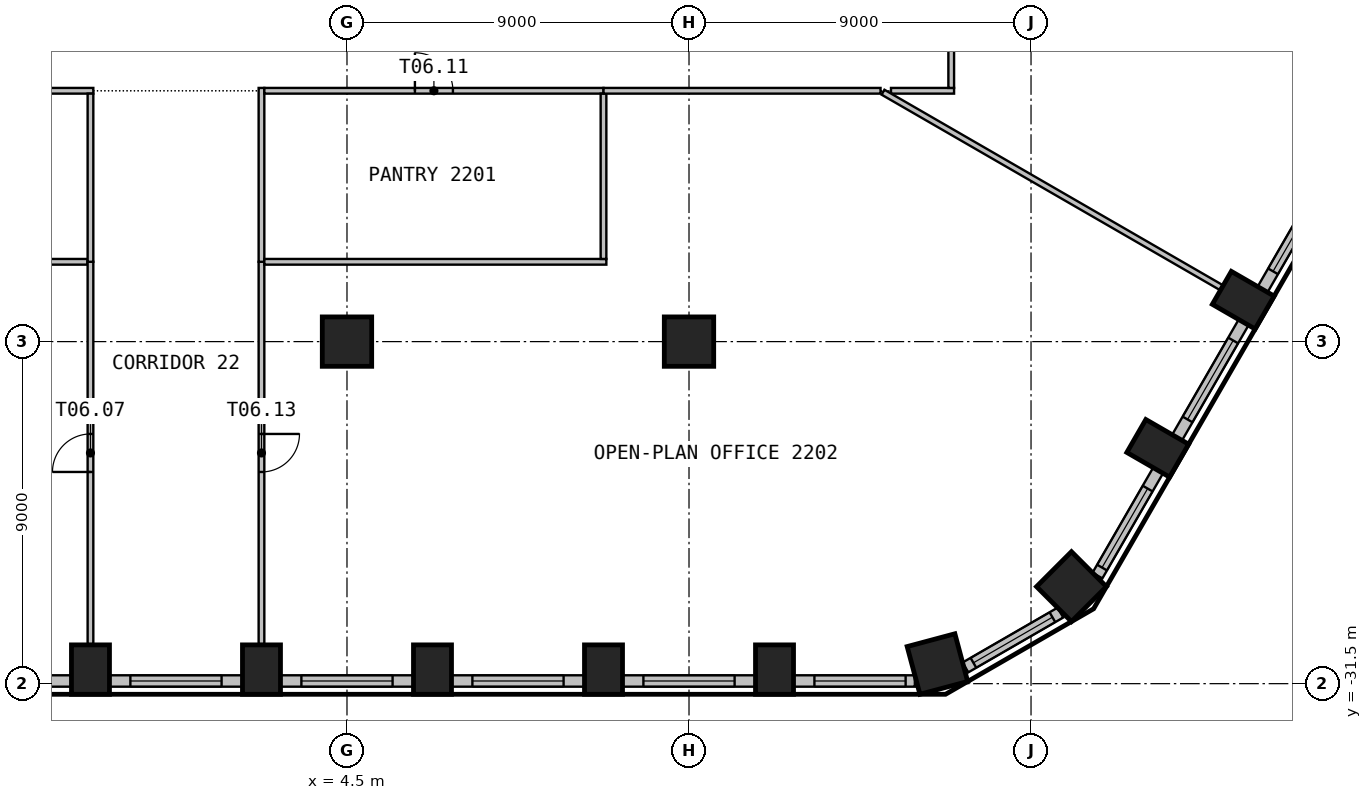
"""IFC4 building model, lengths in metres.
Left out: names, types, materials, properties, quantities, classifications, styles, units other than length and angle.
Written with IfcOpenShell. Run it as: python <this file> out.ifc"""

import sys

from ifc_helpers import new_model, si_unit, direction, frame, frame_2d, origin, origin_2d, place, context, subcontext, project, spatial, rectangle, circle, extrude, element, fill, save


model = new_model("IFC4")
c1 = context("Model", 3, precision=1e-05, world=origin(), true_north=direction((0.0, 1.0)))
c2 = subcontext(c1, "Body", "Model", "MODEL_VIEW")
j1 = project(units=[si_unit("LENGTHUNIT", "METRE"), si_unit("PLANEANGLEUNIT", "RADIAN")], contexts=[c1])
p1 = place(None, origin())
s1 = spatial("IfcSite", under=j1, at=p1, CompositionType="ELEMENT")
p2 = place(p1, origin())
s2 = spatial("IfcBuilding", under=s1, at=p2, CompositionType="ELEMENT")
p3 = place(p2, frame((0.0, 0.0, 93.0)))
s3 = spatial("IfcBuildingStorey", under=s2, at=p3, CompositionType="ELEMENT", Elevation=93.0)
for number, where, z_axis, x_axis in (
    (1, (-2.25, -31.13, 0.0), (0.0, 0.0, 1.0), (1.0, 0.0, 0.0)),
    (2, (2.25, -31.13, 0.0), (0.0, 0.0, 1.0), (1.0, 0.0, 0.0)),
    (3, (6.75, -31.13, 0.0), (0.0, 0.0, 1.0), (1.0, 0.0, 0.0)),
    (4, (11.25, -31.13, 0.0), (0.0, 0.0, 1.0), (1.0, 0.0, 0.0)),
    (5, (15.75, -31.13, 0.0), (0.0, 0.0, 1.0), (1.0, 0.0, 0.0)),
):
    element("IfcColumn", number, at=place(p3, frame(where, z_axis=z_axis, x_axis=x_axis)), inside=s3, PredefinedType="COLUMN", context=c2, shape_type="SweptSolid", body=[
        extrude(rectangle(XDim=1.0, YDim=1.3, at=origin_2d()), origin(), (0.0, 0.0, 1.0), 3.525),
    ])
for number, where, z_axis, x_axis in (
    (6, (20.037, -30.984, 0.0), (0.0, 0.0, 1.0), (0.966, 0.259, 0.0)),
    (7, (23.564, -28.947, 0.0), (0.0, 0.0, 1.0), (0.707, 0.707, 0.0)),
):
    element("IfcColumn", number, at=place(p3, frame(where, z_axis=z_axis, x_axis=x_axis)), inside=s3, PredefinedType="COLUMN", context=c2, shape_type="SweptSolid", body=[
        extrude(rectangle(XDim=1.3, YDim=1.3, at=origin_2d()), origin(), (0.0, 0.0, 1.0), 3.525),
    ])
for number, where, z_axis, x_axis in (
    (8, (25.834, -25.308, 0.0), (0.0, 0.0, 1.0), (0.5, 0.866, 0.0)),
    (9, (28.084, -21.411, 0.0), (0.0, 0.0, 1.0), (0.5, 0.866, 0.0)),
):
    element("IfcColumn", number, at=place(p3, frame(where, z_axis=z_axis, x_axis=x_axis)), inside=s3, PredefinedType="COLUMN", context=c2, shape_type="SweptSolid", body=[
        extrude(rectangle(XDim=1.0, YDim=1.3, at=origin_2d()), origin(), (0.0, 0.0, 1.0), 3.525),
    ])
for number, where, z_axis, x_axis in (
    (10, (4.5, -22.5, 0.0), (0.0, 0.0, 1.0), (1.0, 0.0, 0.0)),
    (11, (13.5, -22.5, 0.0), (0.0, 0.0, 1.0), (1.0, 0.0, 0.0)),
):
    element("IfcColumn", number, at=place(p3, frame(where, z_axis=z_axis, x_axis=x_axis)), inside=s3, PredefinedType="COLUMN", context=c2, shape_type="SweptSolid", body=[
        extrude(circle(Radius=0.65, at=origin_2d()), origin(), (0.0, 0.0, 1.0), 3.525),
    ])
p4 = place(p3, frame((-6.25, -31.43, 0.0), z_axis=(0.0, 0.0, 1.0), x_axis=(1.0, 0.0, 0.0)))
e12 = element("IfcWall", 12, at=p4, inside=s3, PredefinedType="SOLIDWALL", context=c2, shape_type="SweptSolid", body=[
    extrude(rectangle(XDim=3.499, YDim=0.3, at=frame_2d((1.75, 0.0))), origin(), (0.0, 0.0, 1.0), 3.525),
])
p5 = place(p4, frame((0.55, 0.0, 0.9)))
e13 = element("IfcOpeningElement", 13, at=p5, cuts=e12, PredefinedType="OPENING", context=c2, shape_type="SweptSolid", body=[
    extrude(rectangle(XDim=2.4, YDim=2.1, at=frame_2d((1.2, 1.05))), frame((0.0, 0.16, 0.0), z_axis=(0.0, -1.0, 0.0), x_axis=(1.0, 0.0, 0.0)), (0.0, 0.0, 1.0), 0.32),
])
p6 = place(p3, frame((-1.75, -31.43, 0.0), z_axis=(0.0, 0.0, 1.0), x_axis=(1.0, 0.0, 0.0)))
e14 = element("IfcWall", 14, at=p6, inside=s3, PredefinedType="SOLIDWALL", context=c2, shape_type="SweptSolid", body=[
    extrude(rectangle(XDim=3.499, YDim=0.3, at=frame_2d((1.75, 0.0))), origin(), (0.0, 0.0, 1.0), 3.525),
])
p7 = place(p6, frame((0.55, 0.0, 0.9)))
e15 = element("IfcOpeningElement", 15, at=p7, cuts=e14, PredefinedType="OPENING", context=c2, shape_type="SweptSolid", body=[
    extrude(rectangle(XDim=2.4, YDim=2.1, at=frame_2d((1.2, 1.05))), frame((0.0, 0.16, 0.0), z_axis=(0.0, -1.0, 0.0), x_axis=(1.0, 0.0, 0.0)), (0.0, 0.0, 1.0), 0.32),
])
p8 = place(p3, frame((2.75, -31.43, 0.0), z_axis=(0.0, 0.0, 1.0), x_axis=(1.0, 0.0, 0.0)))
e16 = element("IfcWall", 16, at=p8, inside=s3, PredefinedType="SOLIDWALL", context=c2, shape_type="SweptSolid", body=[
    extrude(rectangle(XDim=3.499, YDim=0.3, at=frame_2d((1.75, 0.0))), origin(), (0.0, 0.0, 1.0), 3.525),
])
p9 = place(p8, frame((0.55, 0.0, 0.9)))
e17 = element("IfcOpeningElement", 17, at=p9, cuts=e16, PredefinedType="OPENING", context=c2, shape_type="SweptSolid", body=[
    extrude(rectangle(XDim=2.4, YDim=2.1, at=frame_2d((1.2, 1.05))), frame((0.0, 0.16, 0.0), z_axis=(0.0, -1.0, 0.0), x_axis=(1.0, 0.0, 0.0)), (0.0, 0.0, 1.0), 0.32),
])
p10 = place(p3, frame((7.25, -31.43, 0.0), z_axis=(0.0, 0.0, 1.0), x_axis=(1.0, 0.0, 0.0)))
e18 = element("IfcWall", 18, at=p10, inside=s3, PredefinedType="SOLIDWALL", context=c2, shape_type="SweptSolid", body=[
    extrude(rectangle(XDim=3.499, YDim=0.3, at=frame_2d((1.75, 0.0))), origin(), (0.0, 0.0, 1.0), 3.525),
])
p11 = place(p10, frame((0.55, 0.0, 0.9)))
e19 = element("IfcOpeningElement", 19, at=p11, cuts=e18, PredefinedType="OPENING", context=c2, shape_type="SweptSolid", body=[
    extrude(rectangle(XDim=2.4, YDim=2.1, at=frame_2d((1.2, 1.05))), frame((0.0, 0.16, 0.0), z_axis=(0.0, -1.0, 0.0), x_axis=(1.0, 0.0, 0.0)), (0.0, 0.0, 1.0), 0.32),
])
p12 = place(p3, frame((11.75, -31.43, 0.0), z_axis=(0.0, 0.0, 1.0), x_axis=(1.0, 0.0, 0.0)))
e20 = element("IfcWall", 20, at=p12, inside=s3, PredefinedType="SOLIDWALL", context=c2, shape_type="SweptSolid", body=[
    extrude(rectangle(XDim=3.499, YDim=0.3, at=frame_2d((1.75, 0.0))), origin(), (0.0, 0.0, 1.0), 3.525),
])
p13 = place(p12, frame((0.55, 0.0, 0.9)))
e21 = element("IfcOpeningElement", 21, at=p13, cuts=e20, PredefinedType="OPENING", context=c2, shape_type="SweptSolid", body=[
    extrude(rectangle(XDim=2.4, YDim=2.1, at=frame_2d((1.2, 1.05))), frame((0.0, 0.16, 0.0), z_axis=(0.0, -1.0, 0.0), x_axis=(1.0, 0.0, 0.0)), (0.0, 0.0, 1.0), 0.32),
])
p14 = place(p3, frame((16.25, -31.43, 0.0), z_axis=(0.0, 0.0, 1.0), x_axis=(1.0, 0.0, 0.0)))
e22 = element("IfcWall", 22, at=p14, inside=s3, PredefinedType="SOLIDWALL", context=c2, shape_type="SweptSolid", body=[
    extrude(rectangle(XDim=3.192, YDim=0.3, at=frame_2d((1.596, 0.0))), origin(), (0.0, 0.0, 1.0), 3.525),
])
p15 = place(p14, frame((0.55, 0.0, 0.9)))
e23 = element("IfcOpeningElement", 23, at=p15, cuts=e22, PredefinedType="OPENING", context=c2, shape_type="SweptSolid", body=[
    extrude(rectangle(XDim=2.4, YDim=2.1, at=frame_2d((1.2, 1.05))), frame((0.0, 0.16, 0.0), z_axis=(0.0, -1.0, 0.0), x_axis=(1.0, 0.0, 0.0)), (0.0, 0.0, 1.0), 0.32),
])
p16 = place(p3, frame((20.774, -31.073, 0.0), z_axis=(0.0, 0.0, 1.0), x_axis=(0.866053149362, 0.49995194017, 0.0)))
e24 = element("IfcWall", 24, at=p16, inside=s3, PredefinedType="SOLIDWALL", context=c2, shape_type="SweptSolid", body=[
    extrude(rectangle(XDim=2.885, YDim=0.3, at=frame_2d((1.443, 0.0))), origin(), (0.0, 0.0, 1.0), 3.525),
])
p17 = place(p16, frame((0.243, 0.0, 0.9)))
e25 = element("IfcOpeningElement", 25, at=p17, cuts=e24, PredefinedType="OPENING", context=c2, shape_type="SweptSolid", body=[
    extrude(rectangle(XDim=2.4, YDim=2.1, at=frame_2d((1.2, 1.05))), frame((0.0, 0.16, 0.0), z_axis=(0.0, -1.0, 0.0), x_axis=(1.0, 0.0, 0.0)), (0.0, 0.0, 1.0), 0.32),
])
p18 = place(p3, frame((24.248, -28.656, 0.0), z_axis=(0.0, 0.0, 1.0), x_axis=(0.500004907028, 0.866022570692, 0.0)))
e26 = element("IfcWall", 26, at=p18, inside=s3, PredefinedType="SOLIDWALL", context=c2, shape_type="SweptSolid", body=[
    extrude(rectangle(XDim=3.192, YDim=0.3, at=frame_2d((1.596, 0.0))), origin(), (0.0, 0.0, 1.0), 3.525),
])
p19 = place(p18, frame((0.243, 0.0, 0.9)))
e27 = element("IfcOpeningElement", 27, at=p19, cuts=e26, PredefinedType="OPENING", context=c2, shape_type="SweptSolid", body=[
    extrude(rectangle(XDim=2.4, YDim=2.1, at=frame_2d((1.2, 1.05))), frame((0.0, 0.16, 0.0), z_axis=(0.0, -1.0, 0.0), x_axis=(1.0, 0.0, 0.0)), (0.0, 0.0, 1.0), 0.32),
])
p20 = place(p3, frame((26.344, -25.024, 0.0), z_axis=(0.0, 0.0, 1.0), x_axis=(0.499996256241, 0.866027565234, 0.0)))
e28 = element("IfcWall", 28, at=p20, inside=s3, PredefinedType="SOLIDWALL", context=c2, shape_type="SweptSolid", body=[
    extrude(rectangle(XDim=3.499, YDim=0.3, at=frame_2d((1.75, 0.0))), origin(), (0.0, 0.0, 1.0), 3.525),
])
p21 = place(p20, frame((0.55, 0.0, 0.9)))
e29 = element("IfcOpeningElement", 29, at=p21, cuts=e28, PredefinedType="OPENING", context=c2, shape_type="SweptSolid", body=[
    extrude(rectangle(XDim=2.4, YDim=2.1, at=frame_2d((1.2, 1.05))), frame((0.0, 0.16, 0.0), z_axis=(0.0, -1.0, 0.0), x_axis=(1.0, 0.0, 0.0)), (0.0, 0.0, 1.0), 0.32),
])
p22 = place(p3, frame((28.594, -21.127, 0.0), z_axis=(0.0, 0.0, 1.0), x_axis=(0.499996256241, 0.866027565234, 0.0)))
e30 = element("IfcWall", 30, at=p22, inside=s3, PredefinedType="SOLIDWALL", context=c2, shape_type="SweptSolid", body=[
    extrude(rectangle(XDim=3.499, YDim=0.3, at=frame_2d((1.75, 0.0))), origin(), (0.0, 0.0, 1.0), 3.525),
])
p23 = place(p22, frame((0.55, 0.0, 0.9)))
e31 = element("IfcOpeningElement", 31, at=p23, cuts=e30, PredefinedType="OPENING", context=c2, shape_type="SweptSolid", body=[
    extrude(rectangle(XDim=2.4, YDim=2.1, at=frame_2d((1.2, 1.05))), frame((0.0, 0.16, 0.0), z_axis=(0.0, -1.0, 0.0), x_axis=(1.0, 0.0, 0.0)), (0.0, 0.0, 1.0), 0.32),
])
p24 = place(p3, frame((-11.175, -20.4, 0.0), z_axis=(0.0, 0.0, 1.0), x_axis=(1.0, 0.0, 0.0)))
e32 = element("IfcWall", 32, at=p24, inside=s3, PredefinedType="PARTITIONING", context=c2, shape_type="SweptSolid", body=[
    extrude(rectangle(XDim=8.85, YDim=0.15, at=frame_2d((4.425, 0.0))), origin(), (0.0, 0.0, 1.0), 3.525),
])
p25 = place(p3, frame((-11.25, -15.9, 0.0), z_axis=(0.0, 0.0, 1.0), x_axis=(1.0, 0.0, 0.0)))
e33 = element("IfcWall", 33, at=p25, inside=s3, PredefinedType="PARTITIONING", context=c2, shape_type="SweptSolid", body=[
    extrude(rectangle(XDim=9.075, YDim=0.15, at=frame_2d((4.538, 0.0))), origin(), (0.0, 0.0, 1.0), 3.525),
])
p26 = place(p25, frame((4.038, 0.0, 0.0)))
e34 = element("IfcOpeningElement", 34, at=p26, cuts=e33, PredefinedType="OPENING", context=c2, shape_type="SweptSolid", body=[
    extrude(rectangle(XDim=1.0, YDim=2.1, at=frame_2d((0.5, 1.05))), frame((0.0, 0.085, 0.0), z_axis=(0.0, -1.0, 0.0), x_axis=(1.0, 0.0, 0.0)), (0.0, 0.0, 1.0), 0.17),
])
p27 = place(p3, frame((-2.25, -30.46, 0.0), z_axis=(0.0, 0.0, 1.0), x_axis=(0.0, 1.0, 0.0)))
e35 = element("IfcWall", 35, at=p27, inside=s3, PredefinedType="PARTITIONING", context=c2, shape_type="SweptSolid", body=[
    extrude(rectangle(XDim=10.06, YDim=0.15, at=frame_2d((5.03, 0.0))), origin(), (0.0, 0.0, 1.0), 3.525),
])
p28 = place(p27, frame((4.53, 0.0, 0.0)))
e36 = element("IfcOpeningElement", 36, at=p28, cuts=e35, PredefinedType="OPENING", context=c2, shape_type="SweptSolid", body=[
    extrude(rectangle(XDim=1.0, YDim=2.1, at=frame_2d((0.5, 1.05))), frame((0.0, 0.085, 0.0), z_axis=(0.0, -1.0, 0.0), x_axis=(1.0, 0.0, 0.0)), (0.0, 0.0, 1.0), 0.17),
])
p29 = place(p3, frame((-2.25, -20.4, 0.0), z_axis=(0.0, 0.0, 1.0), x_axis=(0.0, 1.0, 0.0)))
e37 = element("IfcWall", 37, at=p29, inside=s3, PredefinedType="PARTITIONING", context=c2, shape_type="SweptSolid", body=[
    extrude(rectangle(XDim=4.425, YDim=0.15, at=frame_2d((2.212, 0.0))), origin(), (0.0, 0.0, 1.0), 3.525),
])
p30 = place(p3, frame((2.25, -20.4, 0.0), z_axis=(0.0, 0.0, 1.0), x_axis=(0.0, -1.0, 0.0)))
e38 = element("IfcWall", 38, at=p30, inside=s3, PredefinedType="PARTITIONING", context=c2, shape_type="SweptSolid", body=[
    extrude(rectangle(XDim=10.06, YDim=0.15, at=frame_2d((5.03, 0.0))), origin(), (0.0, 0.0, 1.0), 3.525),
])
p31 = place(p30, frame((4.53, 0.0, 0.0)))
e39 = element("IfcOpeningElement", 39, at=p31, cuts=e38, PredefinedType="OPENING", context=c2, shape_type="SweptSolid", body=[
    extrude(rectangle(XDim=1.0, YDim=2.1, at=frame_2d((0.5, 1.05))), frame((0.0, 0.085, 0.0), z_axis=(0.0, -1.0, 0.0), x_axis=(1.0, 0.0, 0.0)), (0.0, 0.0, 1.0), 0.17),
])
p32 = place(p3, frame((2.25, -15.825, 0.0), z_axis=(0.0, 0.0, 1.0), x_axis=(0.0, -1.0, 0.0)))
e40 = element("IfcWall", 40, at=p32, inside=s3, PredefinedType="PARTITIONING", context=c2, shape_type="SweptSolid", body=[
    extrude(rectangle(XDim=4.575, YDim=0.15, at=frame_2d((2.288, 0.0))), origin(), (0.0, 0.0, 1.0), 3.525),
])
p33 = place(p3, frame((11.325, -20.4, 0.0), z_axis=(0.0, 0.0, 1.0), x_axis=(-1.0, 0.0, 0.0)))
e41 = element("IfcWall", 41, at=p33, inside=s3, PredefinedType="PARTITIONING", context=c2, shape_type="SweptSolid", body=[
    extrude(rectangle(XDim=9.0, YDim=0.15, at=frame_2d((4.5, 0.0))), origin(), (0.0, 0.0, 1.0), 3.525),
])
p34 = place(p3, frame((2.325, -15.9, 0.0), z_axis=(0.0, 0.0, 1.0), x_axis=(1.0, 0.0, 0.0)))
e42 = element("IfcWall", 42, at=p34, inside=s3, PredefinedType="PARTITIONING", context=c2, shape_type="SweptSolid", body=[
    extrude(rectangle(XDim=8.925, YDim=0.15, at=frame_2d((4.462, 0.0))), origin(), (0.0, 0.0, 1.0), 3.525),
])
p35 = place(p34, frame((3.962, 0.0, 0.0)))
e43 = element("IfcOpeningElement", 43, at=p35, cuts=e42, PredefinedType="OPENING", context=c2, shape_type="SweptSolid", body=[
    extrude(rectangle(XDim=1.0, YDim=2.1, at=frame_2d((0.5, 1.05))), frame((0.0, 0.085, 0.0), z_axis=(0.0, -1.0, 0.0), x_axis=(1.0, 0.0, 0.0)), (0.0, 0.0, 1.0), 0.17),
])
p36 = place(p3, frame((11.25, -15.975, 0.0), z_axis=(0.0, 0.0, 1.0), x_axis=(0.0, -1.0, 0.0)))
e44 = element("IfcWall", 44, at=p36, inside=s3, PredefinedType="PARTITIONING", context=c2, shape_type="SweptSolid", body=[
    extrude(rectangle(XDim=4.35, YDim=0.15, at=frame_2d((2.175, 0.0))), origin(), (0.0, 0.0, 1.0), 3.525),
])
p37 = place(p3, frame((11.25, -15.9, 0.0), z_axis=(0.0, 0.0, 1.0), x_axis=(1.0, 0.0, 0.0)))
e45 = element("IfcWall", 45, at=p37, inside=s3, PredefinedType="PARTITIONING", context=c2, shape_type="SweptSolid", body=[
    extrude(rectangle(XDim=7.29, YDim=0.15, at=frame_2d((3.645, 0.0))), origin(), (0.0, 0.0, 1.0), 3.525),
])
p38 = place(p3, frame((18.815, -15.9, 0.0), z_axis=(0.0, 0.0, 1.0), x_axis=(1.0, 0.0, 0.0)))
e46 = element("IfcWall", 46, at=p38, inside=s3, PredefinedType="PARTITIONING", context=c2, shape_type="SweptSolid", body=[
    extrude(rectangle(XDim=1.66, YDim=0.15, at=frame_2d((0.83, 0.0))), origin(), (0.0, 0.0, 1.0), 3.525),
])
p39 = place(p3, frame((18.605, -15.938, 0.0), z_axis=(0.0, 0.0, 1.0), x_axis=(0.8659928916, -0.500056308527, 0.0)))
e47 = element("IfcWall", 47, at=p39, inside=s3, PredefinedType="PARTITIONING", context=c2, shape_type="SweptSolid", body=[
    extrude(rectangle(XDim=10.276, YDim=0.15, at=frame_2d((5.138, 0.0))), origin(), (0.0, 0.0, 1.0), 3.525),
])
p40 = place(p3, frame((20.4, -15.825, 0.0), z_axis=(0.0, 0.0, 1.0), x_axis=(0.0, 1.0, 0.0)))
e48 = element("IfcWall", 48, at=p40, inside=s3, PredefinedType="PARTITIONING", context=c2, shape_type="SweptSolid", body=[
    extrude(rectangle(XDim=14.309, YDim=0.15, at=frame_2d((7.154, 0.0))), origin(), (0.0, 0.0, 1.0), 3.525),
])
p41 = place(p40, frame((6.655, 0.0, 0.0)))
e49 = element("IfcOpeningElement", 49, at=p41, cuts=e48, PredefinedType="OPENING", context=c2, shape_type="SweptSolid", body=[
    extrude(rectangle(XDim=1.0, YDim=2.1, at=frame_2d((0.5, 1.05))), frame((0.0, 0.085, 0.0), z_axis=(0.0, -1.0, 0.0), x_axis=(1.0, 0.0, 0.0)), (0.0, 0.0, 1.0), 0.17),
])
p42 = place(p7, origin())
e50 = element("IfcWindow", 50, at=p42, inside=s3, PartitioningType="SINGLE_PANEL", PredefinedType="WINDOW", context=c2, shape_type="SweptSolid", body=[
    extrude(rectangle(XDim=2.4, YDim=2.1, at=frame_2d((1.2, 1.05))), frame((0.0, 0.03, 0.0), z_axis=(0.0, -1.0, 0.0), x_axis=(1.0, 0.0, 0.0)), (0.0, 0.0, 1.0), 0.06),
])
fill(e15, e50)
p43 = place(p9, origin())
e51 = element("IfcWindow", 51, at=p43, inside=s3, PartitioningType="SINGLE_PANEL", PredefinedType="WINDOW", context=c2, shape_type="SweptSolid", body=[
    extrude(rectangle(XDim=2.4, YDim=2.1, at=frame_2d((1.2, 1.05))), frame((0.0, 0.03, 0.0), z_axis=(0.0, -1.0, 0.0), x_axis=(1.0, 0.0, 0.0)), (0.0, 0.0, 1.0), 0.06),
])
fill(e17, e51)
p44 = place(p11, origin())
e52 = element("IfcWindow", 52, at=p44, inside=s3, PartitioningType="SINGLE_PANEL", PredefinedType="WINDOW", context=c2, shape_type="SweptSolid", body=[
    extrude(rectangle(XDim=2.4, YDim=2.1, at=frame_2d((1.2, 1.05))), frame((0.0, 0.03, 0.0), z_axis=(0.0, -1.0, 0.0), x_axis=(1.0, 0.0, 0.0)), (0.0, 0.0, 1.0), 0.06),
])
fill(e19, e52)
p45 = place(p13, origin())
e53 = element("IfcWindow", 53, at=p45, inside=s3, PartitioningType="SINGLE_PANEL", PredefinedType="WINDOW", context=c2, shape_type="SweptSolid", body=[
    extrude(rectangle(XDim=2.4, YDim=2.1, at=frame_2d((1.2, 1.05))), frame((0.0, 0.03, 0.0), z_axis=(0.0, -1.0, 0.0), x_axis=(1.0, 0.0, 0.0)), (0.0, 0.0, 1.0), 0.06),
])
fill(e21, e53)
p46 = place(p15, origin())
e54 = element("IfcWindow", 54, at=p46, inside=s3, PartitioningType="SINGLE_PANEL", PredefinedType="WINDOW", context=c2, shape_type="SweptSolid", body=[
    extrude(rectangle(XDim=2.4, YDim=2.1, at=frame_2d((1.2, 1.05))), frame((0.0, 0.03, 0.0), z_axis=(0.0, -1.0, 0.0), x_axis=(1.0, 0.0, 0.0)), (0.0, 0.0, 1.0), 0.06),
])
fill(e23, e54)
p47 = place(p17, origin())
e55 = element("IfcWindow", 55, at=p47, inside=s3, PartitioningType="SINGLE_PANEL", PredefinedType="WINDOW", context=c2, shape_type="SweptSolid", body=[
    extrude(rectangle(XDim=2.4, YDim=2.1, at=frame_2d((1.2, 1.05))), frame((0.0, 0.03, 0.0), z_axis=(0.0, -1.0, 0.0), x_axis=(1.0, 0.0, 0.0)), (0.0, 0.0, 1.0), 0.06),
])
fill(e25, e55)
p48 = place(p19, origin())
e56 = element("IfcWindow", 56, at=p48, inside=s3, PartitioningType="SINGLE_PANEL", PredefinedType="WINDOW", context=c2, shape_type="SweptSolid", body=[
    extrude(rectangle(XDim=2.4, YDim=2.1, at=frame_2d((1.2, 1.05))), frame((0.0, 0.03, 0.0), z_axis=(0.0, -1.0, 0.0), x_axis=(1.0, 0.0, 0.0)), (0.0, 0.0, 1.0), 0.06),
])
fill(e27, e56)
p49 = place(p21, origin())
e57 = element("IfcWindow", 57, at=p49, inside=s3, PartitioningType="SINGLE_PANEL", PredefinedType="WINDOW", context=c2, shape_type="SweptSolid", body=[
    extrude(rectangle(XDim=2.4, YDim=2.1, at=frame_2d((1.2, 1.05))), frame((0.0, 0.03, 0.0), z_axis=(0.0, -1.0, 0.0), x_axis=(1.0, 0.0, 0.0)), (0.0, 0.0, 1.0), 0.06),
])
fill(e29, e57)
p50 = place(p23, origin())
e58 = element("IfcWindow", 58, at=p50, inside=s3, PartitioningType="SINGLE_PANEL", PredefinedType="WINDOW", context=c2, shape_type="SweptSolid", body=[
    extrude(rectangle(XDim=2.4, YDim=2.1, at=frame_2d((1.2, 1.05))), frame((0.0, 0.03, 0.0), z_axis=(0.0, -1.0, 0.0), x_axis=(1.0, 0.0, 0.0)), (0.0, 0.0, 1.0), 0.06),
])
fill(e31, e58)
p51 = place(p28, origin())
e59 = element("IfcDoor", 59, at=p51, inside=s3, OperationType="SINGLE_SWING_LEFT", PredefinedType="DOOR", context=c2, shape_type="SweptSolid", body=[
    extrude(rectangle(XDim=1.0, YDim=2.1, at=frame_2d((0.5, 1.05))), frame((0.0, 0.025, 0.0), z_axis=(0.0, -1.0, 0.0), x_axis=(1.0, 0.0, 0.0)), (0.0, 0.0, 1.0), 0.05),
])
fill(e36, e59)
p52 = place(p35, origin())
e60 = element("IfcDoor", 60, at=p52, inside=s3, OperationType="SINGLE_SWING_RIGHT", PredefinedType="DOOR", context=c2, shape_type="SweptSolid", body=[
    extrude(rectangle(XDim=1.0, YDim=2.1, at=frame_2d((0.5, 1.05))), frame((0.0, 0.025, 0.0), z_axis=(0.0, -1.0, 0.0), x_axis=(1.0, 0.0, 0.0)), (0.0, 0.0, 1.0), 0.05),
])
fill(e43, e60)
p53 = place(p31, origin())
e61 = element("IfcDoor", 61, at=p53, inside=s3, OperationType="SINGLE_SWING_RIGHT", PredefinedType="DOOR", context=c2, shape_type="SweptSolid", body=[
    extrude(rectangle(XDim=1.0, YDim=2.1, at=frame_2d((0.5, 1.05))), frame((0.0, 0.025, 0.0), z_axis=(0.0, -1.0, 0.0), x_axis=(1.0, 0.0, 0.0)), (0.0, 0.0, 1.0), 0.05),
])
fill(e39, e61)
save(model, sys.argv[1])
